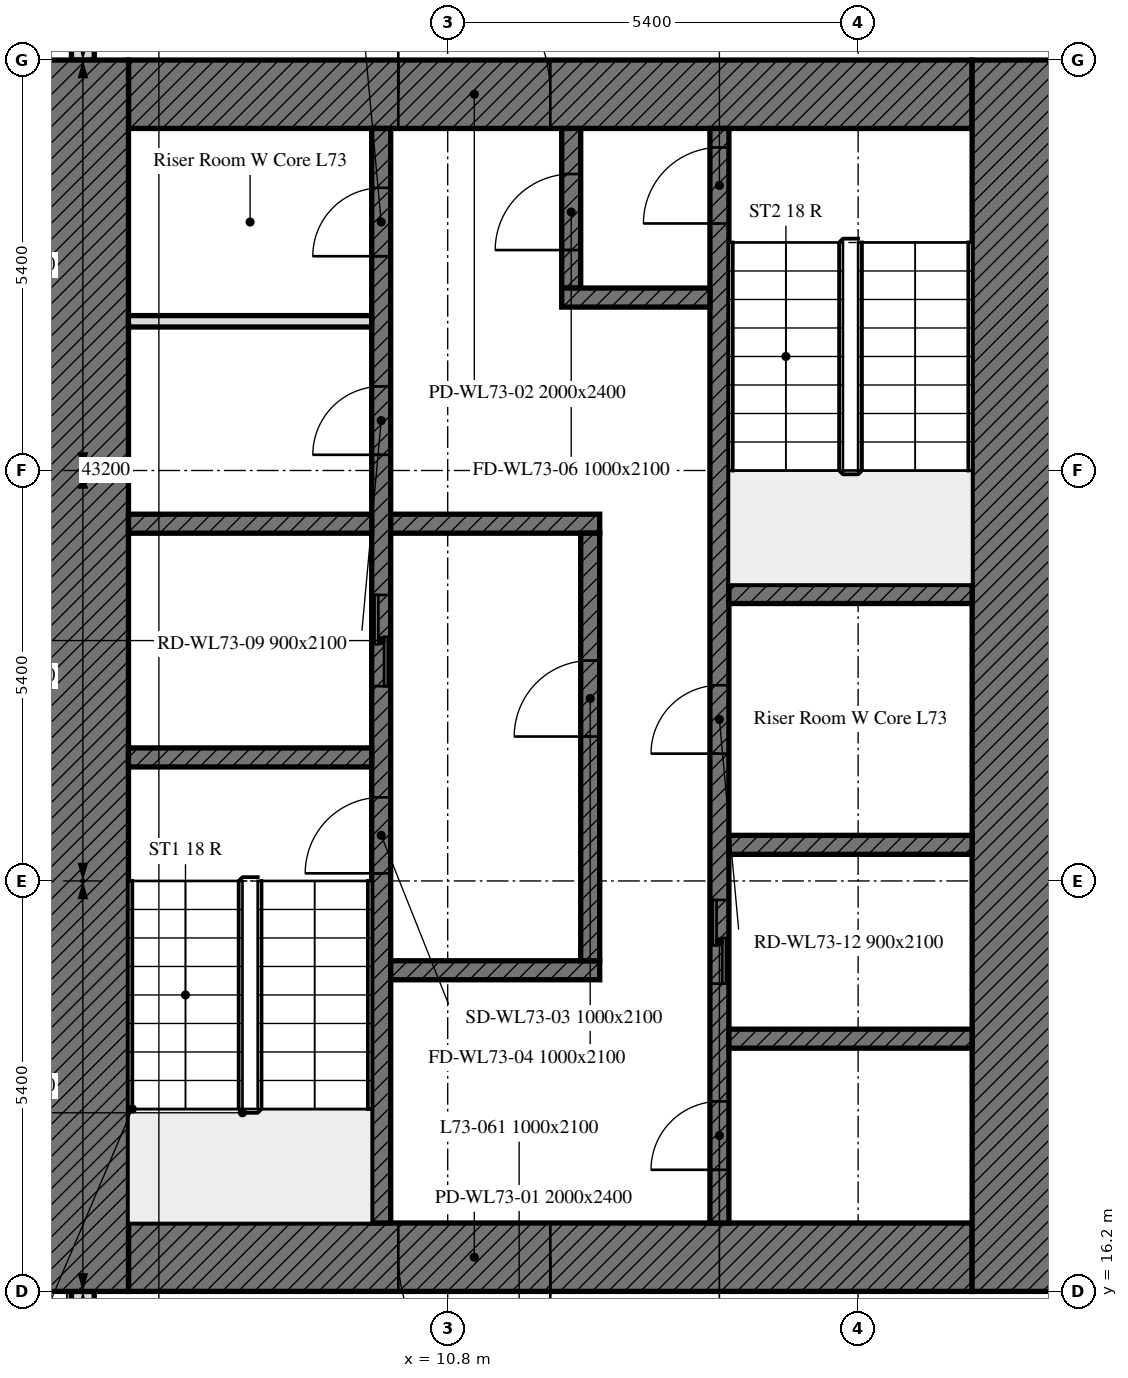
"""IFC4 building model, lengths in metres.
Left out: names, types, materials, properties, quantities, classifications, styles, units other than length and angle.
Written with IfcOpenShell. Run it as: python <this file> out.ifc"""

import sys

from ifc_helpers import new_model, si_unit, direction, frame, frame_2d, origin, place, context, subcontext, project, spatial, rectangle, extrude, element, fill, save


model = new_model("IFC4")
c1 = context("Model", 3, precision=1e-05, world=origin(), true_north=direction((0.0, 1.0)))
c2 = subcontext(c1, "Body", "Model", "MODEL_VIEW")
j1 = project(units=[si_unit("LENGTHUNIT", "METRE"), si_unit("PLANEANGLEUNIT", "RADIAN")], contexts=[c1])
p1 = place(None, origin())
s1 = spatial("IfcSite", under=j1, at=p1, CompositionType="ELEMENT")
p2 = place(p1, origin())
s2 = spatial("IfcBuilding", under=s1, at=p2, CompositionType="ELEMENT")
p3 = place(p2, frame((0.0, 0.0, 295.0)))
s3 = spatial("IfcBuildingStorey", under=s2, at=p3, CompositionType="ELEMENT", Elevation=295.0)
p4 = place(p3, frame((6.0, 43.014, 0.0), z_axis=(0.0, 0.0, 1.0), x_axis=(0.0, -1.0, 0.0)))
e1 = element("IfcWall", 1, at=p4, inside=s3, PredefinedType="SOLIDWALL", context=c2, shape_type="SweptSolid", body=[
    extrude(rectangle(XDim=10.614, YDim=0.3, at=frame_2d((5.307, 0.0))), origin(), (0.0, 0.0, 1.0), 3.0),
])
p5 = place(p4, frame((1.789, 0.0, 0.9)))
e2 = element("IfcOpeningElement", 2, at=p5, cuts=e1, PredefinedType="OPENING", context=c2, shape_type="SweptSolid", body=[
    extrude(rectangle(XDim=0.65, YDim=1.7, at=frame_2d((0.325, 0.85))), frame((0.0, 0.16, 0.0), z_axis=(0.0, -1.0, 0.0), x_axis=(1.0, 0.0, 0.0)), (0.0, 0.0, 1.0), 0.32),
])
p6 = place(p4, frame((2.764, 0.0, 0.9)))
e3 = element("IfcOpeningElement", 3, at=p6, cuts=e1, PredefinedType="OPENING", context=c2, shape_type="SweptSolid", body=[
    extrude(rectangle(XDim=1.1, YDim=1.7, at=frame_2d((0.55, 0.85))), frame((0.0, 0.16, 0.0), z_axis=(0.0, -1.0, 0.0), x_axis=(1.0, 0.0, 0.0)), (0.0, 0.0, 1.0), 0.32),
])
p7 = place(p4, frame((6.564, 0.0, 0.9)))
e4 = element("IfcOpeningElement", 4, at=p7, cuts=e1, PredefinedType="OPENING", context=c2, shape_type="SweptSolid", body=[
    extrude(rectangle(XDim=1.1, YDim=1.7, at=frame_2d((0.55, 0.85))), frame((0.0, 0.16, 0.0), z_axis=(0.0, -1.0, 0.0), x_axis=(1.0, 0.0, 0.0)), (0.0, 0.0, 1.0), 0.32),
])
p8 = place(p4, frame((8.539, 0.0, 0.9)))
e5 = element("IfcOpeningElement", 5, at=p8, cuts=e1, PredefinedType="OPENING", context=c2, shape_type="SweptSolid", body=[
    extrude(rectangle(XDim=0.65, YDim=1.7, at=frame_2d((0.325, 0.85))), frame((0.0, 0.16, 0.0), z_axis=(0.0, -1.0, 0.0), x_axis=(1.0, 0.0, 0.0)), (0.0, 0.0, 1.0), 0.32),
])
p9 = place(p3, frame((6.0, 16.2, 0.0), z_axis=(0.0, 0.0, 1.0), x_axis=(0.0, -1.0, 0.0)))
e6 = element("IfcWall", 6, at=p9, inside=s3, PredefinedType="SOLIDWALL", context=c2, shape_type="SweptSolid", body=[
    extrude(rectangle(XDim=5.214, YDim=0.3, at=frame_2d((2.607, 0.0))), origin(), (0.0, 0.0, 1.0), 3.0),
])
p10 = place(p9, frame((1.0, 0.0, 0.9)))
e7 = element("IfcOpeningElement", 7, at=p10, cuts=e6, PredefinedType="OPENING", context=c2, shape_type="SweptSolid", body=[
    extrude(rectangle(XDim=1.1, YDim=1.7, at=frame_2d((0.55, 0.85))), frame((0.0, 0.16, 0.0), z_axis=(0.0, -1.0, 0.0), x_axis=(1.0, 0.0, 0.0)), (0.0, 0.0, 1.0), 0.32),
])
p11 = place(p9, frame((2.95, 0.0, 0.9)))
e8 = element("IfcOpeningElement", 8, at=p11, cuts=e6, PredefinedType="OPENING", context=c2, shape_type="SweptSolid", body=[
    extrude(rectangle(XDim=1.1, YDim=1.7, at=frame_2d((0.55, 0.85))), frame((0.0, 0.16, 0.0), z_axis=(0.0, -1.0, 0.0), x_axis=(1.0, 0.0, 0.0)), (0.0, 0.0, 1.0), 0.32),
])
p12 = place(p3, frame((17.7, 16.65, 0.0), z_axis=(0.0, 0.0, 1.0), x_axis=(-1.0, 0.0, 0.0)))
e9 = element("IfcWall", 9, at=p12, inside=s3, PredefinedType="SOLIDWALL", context=c2, shape_type="SweptSolid", body=[
    extrude(rectangle(XDim=11.1, YDim=0.9, at=frame_2d((5.55, 0.0))), origin(), (0.0, 0.0, 1.0), 3.0),
])
p13 = place(p12, frame((5.55, 0.0, 0.0)))
e10 = element("IfcOpeningElement", 10, at=p13, cuts=e9, PredefinedType="OPENING", context=c2, shape_type="SweptSolid", body=[
    extrude(rectangle(XDim=2.0, YDim=2.4, at=frame_2d((1.0, 1.2))), frame((0.0, 0.45, 0.0), z_axis=(0.0, -1.0, 0.0), x_axis=(1.0, 0.0, 0.0)), (0.0, 0.0, 1.0), 0.9),
])
p14 = place(p3, frame((6.6, 31.95, 0.0), z_axis=(0.0, 0.0, 1.0), x_axis=(1.0, 0.0, 0.0)))
e11 = element("IfcWall", 11, at=p14, inside=s3, PredefinedType="SOLIDWALL", context=c2, shape_type="SweptSolid", body=[
    extrude(rectangle(XDim=11.1, YDim=0.9, at=frame_2d((5.55, 0.0))), origin(), (0.0, 0.0, 1.0), 3.0),
])
p15 = place(p14, frame((3.55, 0.0, 0.0)))
e12 = element("IfcOpeningElement", 12, at=p15, cuts=e11, PredefinedType="OPENING", context=c2, shape_type="SweptSolid", body=[
    extrude(rectangle(XDim=2.0, YDim=2.4, at=frame_2d((1.0, 1.2))), frame((0.0, 0.45, 0.0), z_axis=(0.0, -1.0, 0.0), x_axis=(1.0, 0.0, 0.0)), (0.0, 0.0, 1.0), 0.9),
])
for number, where, z_axis, x_axis in (
    (13, (6.0, 16.2, 0.0), (0.0, 0.0, 1.0), (0.0, 1.0, 0.0)),
    (14, (18.3, 32.4, 0.0), (0.0, 0.0, 1.0), (0.0, -1.0, 0.0)),
):
    element("IfcWall", number, at=place(p3, frame(where, z_axis=z_axis, x_axis=x_axis)), inside=s3, PredefinedType="SOLIDWALL", context=c2, shape_type="SweptSolid", body=[
        extrude(rectangle(XDim=16.2, YDim=1.2, at=frame_2d((8.1, 0.0))), origin(), (0.0, 0.0, 1.0), 3.0),
    ])
p16 = place(p3, frame((9.925, 17.1, 0.0), z_axis=(0.0, 0.0, 1.0), x_axis=(0.0, 1.0, 0.0)))
e15 = element("IfcWall", 15, at=p16, inside=s3, PredefinedType="SOLIDWALL", context=c2, shape_type="SweptSolid", body=[
    extrude(rectangle(XDim=14.4, YDim=0.25, at=frame_2d((7.2, 0.0))), origin(), (0.0, 0.0, 1.0), 3.0),
])
p17 = place(p16, frame((4.6, 0.0, 0.0)))
e16 = element("IfcOpeningElement", 16, at=p17, cuts=e15, PredefinedType="OPENING", context=c2, shape_type="SweptSolid", body=[
    extrude(rectangle(XDim=1.0, YDim=2.1, at=frame_2d((0.5, 1.05))), frame((0.0, 0.125, 0.0), z_axis=(0.0, -1.0, 0.0), x_axis=(1.0, 0.0, 0.0)), (0.0, 0.0, 1.0), 0.25),
])
p18 = place(p16, frame((7.062, 0.0, 0.0)))
e17 = element("IfcOpeningElement", 17, at=p18, cuts=e15, PredefinedType="OPENING", context=c2, shape_type="SweptSolid", body=[
    extrude(rectangle(XDim=1.2, YDim=2.1, at=frame_2d((0.6, 1.05))), frame((0.0, 0.125, 0.0), z_axis=(0.0, -1.0, 0.0), x_axis=(1.0, 0.0, 0.0)), (0.0, 0.0, 1.0), 0.25),
])
p19 = place(p16, frame((10.106, 0.0, 0.0)))
e18 = element("IfcOpeningElement", 18, at=p19, cuts=e15, PredefinedType="OPENING", context=c2, shape_type="SweptSolid", body=[
    extrude(rectangle(XDim=0.9, YDim=2.1, at=frame_2d((0.45, 1.05))), frame((0.0, 0.125, 0.0), z_axis=(0.0, -1.0, 0.0), x_axis=(1.0, 0.0, 0.0)), (0.0, 0.0, 1.0), 0.25),
])
p20 = place(p16, frame((12.719, 0.0, 0.0)))
e19 = element("IfcOpeningElement", 19, at=p20, cuts=e15, PredefinedType="OPENING", context=c2, shape_type="SweptSolid", body=[
    extrude(rectangle(XDim=0.9, YDim=2.1, at=frame_2d((0.45, 1.05))), frame((0.0, 0.125, 0.0), z_axis=(0.0, -1.0, 0.0), x_axis=(1.0, 0.0, 0.0)), (0.0, 0.0, 1.0), 0.25),
])
p21 = place(p3, frame((14.375, 17.1, 0.0), z_axis=(0.0, 0.0, 1.0), x_axis=(0.0, 1.0, 0.0)))
e20 = element("IfcWall", 20, at=p21, inside=s3, PredefinedType="SOLIDWALL", context=c2, shape_type="SweptSolid", body=[
    extrude(rectangle(XDim=14.4, YDim=0.25, at=frame_2d((7.2, 0.0))), origin(), (0.0, 0.0, 1.0), 3.0),
])
p22 = place(p21, frame((13.15, 0.0, 0.0)))
e21 = element("IfcOpeningElement", 21, at=p22, cuts=e20, PredefinedType="OPENING", context=c2, shape_type="SweptSolid", body=[
    extrude(rectangle(XDim=1.0, YDim=2.1, at=frame_2d((0.5, 1.05))), frame((0.0, 0.125, 0.0), z_axis=(0.0, -1.0, 0.0), x_axis=(1.0, 0.0, 0.0)), (0.0, 0.0, 1.0), 0.25),
])
p23 = place(p21, frame((3.15, 0.0, 0.0)))
e22 = element("IfcOpeningElement", 22, at=p23, cuts=e20, PredefinedType="OPENING", context=c2, shape_type="SweptSolid", body=[
    extrude(rectangle(XDim=1.1, YDim=2.1, at=frame_2d((0.55, 1.05))), frame((0.0, 0.125, 0.0), z_axis=(0.0, -1.0, 0.0), x_axis=(1.0, 0.0, 0.0)), (0.0, 0.0, 1.0), 0.25),
])
p24 = place(p21, frame((0.7, 0.0, 0.0)))
e23 = element("IfcOpeningElement", 23, at=p24, cuts=e20, PredefinedType="OPENING", context=c2, shape_type="SweptSolid", body=[
    extrude(rectangle(XDim=0.9, YDim=2.1, at=frame_2d((0.45, 1.05))), frame((0.0, 0.125, 0.0), z_axis=(0.0, -1.0, 0.0), x_axis=(1.0, 0.0, 0.0)), (0.0, 0.0, 1.0), 0.25),
])
p25 = place(p21, frame((6.175, 0.0, 0.0)))
e24 = element("IfcOpeningElement", 24, at=p25, cuts=e20, PredefinedType="OPENING", context=c2, shape_type="SweptSolid", body=[
    extrude(rectangle(XDim=0.9, YDim=2.1, at=frame_2d((0.45, 1.05))), frame((0.0, 0.125, 0.0), z_axis=(0.0, -1.0, 0.0), x_axis=(1.0, 0.0, 0.0)), (0.0, 0.0, 1.0), 0.25),
])
for number, where, z_axis, x_axis in (
    (25, (6.6, 23.225, 0.0), (0.0, 0.0, 1.0), (1.0, 0.0, 0.0)),
    (26, (14.5, 25.375, 0.0), (0.0, 0.0, 1.0), (1.0, 0.0, 0.0)),
    (27, (14.5, 22.075, 0.0), (0.0, 0.0, 1.0), (1.0, 0.0, 0.0)),
    (28, (6.6, 26.3, 0.0), (0.0, 0.0, 1.0), (1.0, 0.0, 0.0)),
):
    element("IfcWall", number, at=place(p3, frame(where, z_axis=z_axis, x_axis=x_axis)), inside=s3, PredefinedType="SOLIDWALL", context=c2, shape_type="SweptSolid", body=[
        extrude(rectangle(XDim=3.2, YDim=0.25, at=frame_2d((1.6, 0.0))), origin(), (0.0, 0.0, 1.0), 3.0),
    ])
for number, where, z_axis, x_axis in (
    (29, (10.05, 26.3, 0.0), (0.0, 0.0, 1.0), (1.0, 0.0, 0.0)),
    (30, (10.05, 20.425, 0.0), (0.0, 0.0, 1.0), (1.0, 0.0, 0.0)),
):
    element("IfcWall", number, at=place(p3, frame(where, z_axis=z_axis, x_axis=x_axis)), inside=s3, PredefinedType="SOLIDWALL", context=c2, shape_type="SweptSolid", body=[
        extrude(rectangle(XDim=2.75, YDim=0.25, at=frame_2d((1.375, 0.0))), origin(), (0.0, 0.0, 1.0), 3.0),
    ])
p26 = place(p3, frame((12.425, 29.4, 0.0), z_axis=(0.0, 0.0, 1.0), x_axis=(0.0, 1.0, 0.0)))
e31 = element("IfcWall", 31, at=p26, inside=s3, PredefinedType="SOLIDWALL", context=c2, shape_type="SweptSolid", body=[
    extrude(rectangle(XDim=2.1, YDim=0.25, at=frame_2d((1.05, 0.0))), origin(), (0.0, 0.0, 1.0), 3.0),
])
p27 = place(p26, frame((0.5, 0.0, 0.0)))
e32 = element("IfcOpeningElement", 32, at=p27, cuts=e31, PredefinedType="OPENING", context=c2, shape_type="SweptSolid", body=[
    extrude(rectangle(XDim=1.0, YDim=2.1, at=frame_2d((0.5, 1.05))), frame((0.0, 0.125, 0.0), z_axis=(0.0, -1.0, 0.0), x_axis=(1.0, 0.0, 0.0)), (0.0, 0.0, 1.0), 0.25),
])
p28 = place(p3, frame((12.3, 29.275, 0.0), z_axis=(0.0, 0.0, 1.0), x_axis=(1.0, 0.0, 0.0)))
e33 = element("IfcWall", 33, at=p28, inside=s3, PredefinedType="SOLIDWALL", context=c2, shape_type="SweptSolid", body=[
    extrude(rectangle(XDim=1.95, YDim=0.25, at=frame_2d((0.975, 0.0))), origin(), (0.0, 0.0, 1.0), 3.0),
])
p29 = place(p3, frame((12.675, 20.55, 0.0), z_axis=(0.0, 0.0, 1.0), x_axis=(0.0, 1.0, 0.0)))
e34 = element("IfcWall", 34, at=p29, inside=s3, PredefinedType="SOLIDWALL", context=c2, shape_type="SweptSolid", body=[
    extrude(rectangle(XDim=5.625, YDim=0.25, at=frame_2d((2.812, 0.0))), origin(), (0.0, 0.0, 1.0), 3.0),
])
p30 = place(p29, frame((2.95, 0.0, 0.0)))
e35 = element("IfcOpeningElement", 35, at=p30, cuts=e34, PredefinedType="OPENING", context=c2, shape_type="SweptSolid", body=[
    extrude(rectangle(XDim=1.0, YDim=2.1, at=frame_2d((0.5, 1.05))), frame((0.0, 0.125, 0.0), z_axis=(0.0, -1.0, 0.0), x_axis=(1.0, 0.0, 0.0)), (0.0, 0.0, 1.0), 0.25),
])
p31 = place(p3, frame((14.5, 19.525, 0.0), z_axis=(0.0, 0.0, 1.0), x_axis=(1.0, 0.0, 0.0)))
e36 = element("IfcWall", 36, at=p31, inside=s3, PredefinedType="SOLIDWALL", context=c2, shape_type="SweptSolid", body=[
    extrude(rectangle(XDim=3.2, YDim=0.25, at=frame_2d((1.6, 0.0))), origin(), (0.0, 0.0, 1.0), 3.0),
])
p32 = place(p3, frame((6.6, 28.963, 0.0), z_axis=(0.0, 0.0, 1.0), x_axis=(1.0, 0.0, 0.0)))
e37 = element("IfcWall", 37, at=p32, inside=s3, PredefinedType="PARTITIONING", context=c2, shape_type="SweptSolid", body=[
    extrude(rectangle(XDim=3.2, YDim=0.15, at=frame_2d((1.6, 0.0))), origin(), (0.0, 0.0, 1.0), 3.0),
])
p33 = place(p13, origin())
e38 = element("IfcDoor", 38, at=p33, inside=s3, OperationType="DOUBLE_DOOR_SINGLE_SWING", PredefinedType="DOOR", context=c2, shape_type="SweptSolid", body=[
    extrude(rectangle(XDim=2.0, YDim=2.4, at=frame_2d((1.0, 1.2))), frame((0.0, 0.025, 0.0), z_axis=(0.0, -1.0, 0.0), x_axis=(1.0, 0.0, 0.0)), (0.0, 0.0, 1.0), 0.05),
])
fill(e10, e38)
p34 = place(p15, origin())
e39 = element("IfcDoor", 39, at=p34, inside=s3, OperationType="DOUBLE_DOOR_SINGLE_SWING", PredefinedType="DOOR", context=c2, shape_type="SweptSolid", body=[
    extrude(rectangle(XDim=2.0, YDim=2.4, at=frame_2d((1.0, 1.2))), frame((0.0, 0.025, 0.0), z_axis=(0.0, -1.0, 0.0), x_axis=(1.0, 0.0, 0.0)), (0.0, 0.0, 1.0), 0.05),
])
fill(e12, e39)
p35 = place(p17, origin())
e40 = element("IfcDoor", 40, at=p35, inside=s3, OperationType="SINGLE_SWING_LEFT", PredefinedType="DOOR", context=c2, shape_type="SweptSolid", body=[
    extrude(rectangle(XDim=1.0, YDim=2.1, at=frame_2d((0.5, 1.05))), frame((0.0, 0.025, 0.0), z_axis=(0.0, -1.0, 0.0), x_axis=(1.0, 0.0, 0.0)), (0.0, 0.0, 1.0), 0.05),
])
fill(e16, e40)
p36 = place(p30, origin())
e41 = element("IfcDoor", 41, at=p36, inside=s3, OperationType="SINGLE_SWING_LEFT", PredefinedType="DOOR", context=c2, shape_type="SweptSolid", body=[
    extrude(rectangle(XDim=1.0, YDim=2.1, at=frame_2d((0.5, 1.05))), frame((0.0, 0.025, 0.0), z_axis=(0.0, -1.0, 0.0), x_axis=(1.0, 0.0, 0.0)), (0.0, 0.0, 1.0), 0.05),
])
fill(e35, e41)
p37 = place(p22, origin())
e42 = element("IfcDoor", 42, at=p37, inside=s3, OperationType="SINGLE_SWING_LEFT", PredefinedType="DOOR", context=c2, shape_type="SweptSolid", body=[
    extrude(rectangle(XDim=1.0, YDim=2.1, at=frame_2d((0.5, 1.05))), frame((0.0, 0.025, 0.0), z_axis=(0.0, -1.0, 0.0), x_axis=(1.0, 0.0, 0.0)), (0.0, 0.0, 1.0), 0.05),
])
fill(e21, e42)
p38 = place(p27, origin())
e43 = element("IfcDoor", 43, at=p38, inside=s3, OperationType="SINGLE_SWING_LEFT", PredefinedType="DOOR", context=c2, shape_type="SweptSolid", body=[
    extrude(rectangle(XDim=1.0, YDim=2.1, at=frame_2d((0.5, 1.05))), frame((0.0, 0.025, 0.0), z_axis=(0.0, -1.0, 0.0), x_axis=(1.0, 0.0, 0.0)), (0.0, 0.0, 1.0), 0.05),
])
fill(e32, e43)
p39 = place(p18, origin())
e44 = element("IfcDoor", 44, at=p39, inside=s3, OperationType="DOUBLE_DOOR_SLIDING", PredefinedType="DOOR", context=c2, shape_type="SweptSolid", body=[
    extrude(rectangle(XDim=1.2, YDim=2.1, at=frame_2d((0.6, 1.05))), frame((0.0, 0.025, 0.0), z_axis=(0.0, -1.0, 0.0), x_axis=(1.0, 0.0, 0.0)), (0.0, 0.0, 1.0), 0.05),
])
fill(e17, e44)
p40 = place(p23, origin())
e45 = element("IfcDoor", 45, at=p40, inside=s3, OperationType="DOUBLE_DOOR_SLIDING", PredefinedType="DOOR", context=c2, shape_type="SweptSolid", body=[
    extrude(rectangle(XDim=1.1, YDim=2.1, at=frame_2d((0.55, 1.05))), frame((0.0, 0.025, 0.0), z_axis=(0.0, -1.0, 0.0), x_axis=(1.0, 0.0, 0.0)), (0.0, 0.0, 1.0), 0.05),
])
fill(e22, e45)
p41 = place(p19, origin())
e46 = element("IfcDoor", 46, at=p41, inside=s3, OperationType="SINGLE_SWING_LEFT", PredefinedType="DOOR", context=c2, shape_type="SweptSolid", body=[
    extrude(rectangle(XDim=0.9, YDim=2.1, at=frame_2d((0.45, 1.05))), frame((0.0, 0.025, 0.0), z_axis=(0.0, -1.0, 0.0), x_axis=(1.0, 0.0, 0.0)), (0.0, 0.0, 1.0), 0.05),
])
fill(e18, e46)
p42 = place(p20, origin())
e47 = element("IfcDoor", 47, at=p42, inside=s3, OperationType="SINGLE_SWING_LEFT", PredefinedType="DOOR", context=c2, shape_type="SweptSolid", body=[
    extrude(rectangle(XDim=0.9, YDim=2.1, at=frame_2d((0.45, 1.05))), frame((0.0, 0.025, 0.0), z_axis=(0.0, -1.0, 0.0), x_axis=(1.0, 0.0, 0.0)), (0.0, 0.0, 1.0), 0.05),
])
fill(e19, e47)
p43 = place(p24, origin())
e48 = element("IfcDoor", 48, at=p43, inside=s3, OperationType="SINGLE_SWING_LEFT", PredefinedType="DOOR", context=c2, shape_type="SweptSolid", body=[
    extrude(rectangle(XDim=0.9, YDim=2.1, at=frame_2d((0.45, 1.05))), frame((0.0, 0.025, 0.0), z_axis=(0.0, -1.0, 0.0), x_axis=(1.0, 0.0, 0.0)), (0.0, 0.0, 1.0), 0.05),
])
fill(e23, e48)
p44 = place(p25, origin())
e49 = element("IfcDoor", 49, at=p44, inside=s3, OperationType="SINGLE_SWING_LEFT", PredefinedType="DOOR", context=c2, shape_type="SweptSolid", body=[
    extrude(rectangle(XDim=0.9, YDim=2.1, at=frame_2d((0.45, 1.05))), frame((0.0, 0.025, 0.0), z_axis=(0.0, -1.0, 0.0), x_axis=(1.0, 0.0, 0.0)), (0.0, 0.0, 1.0), 0.05),
])
fill(e24, e49)
save(model, sys.argv[1])
